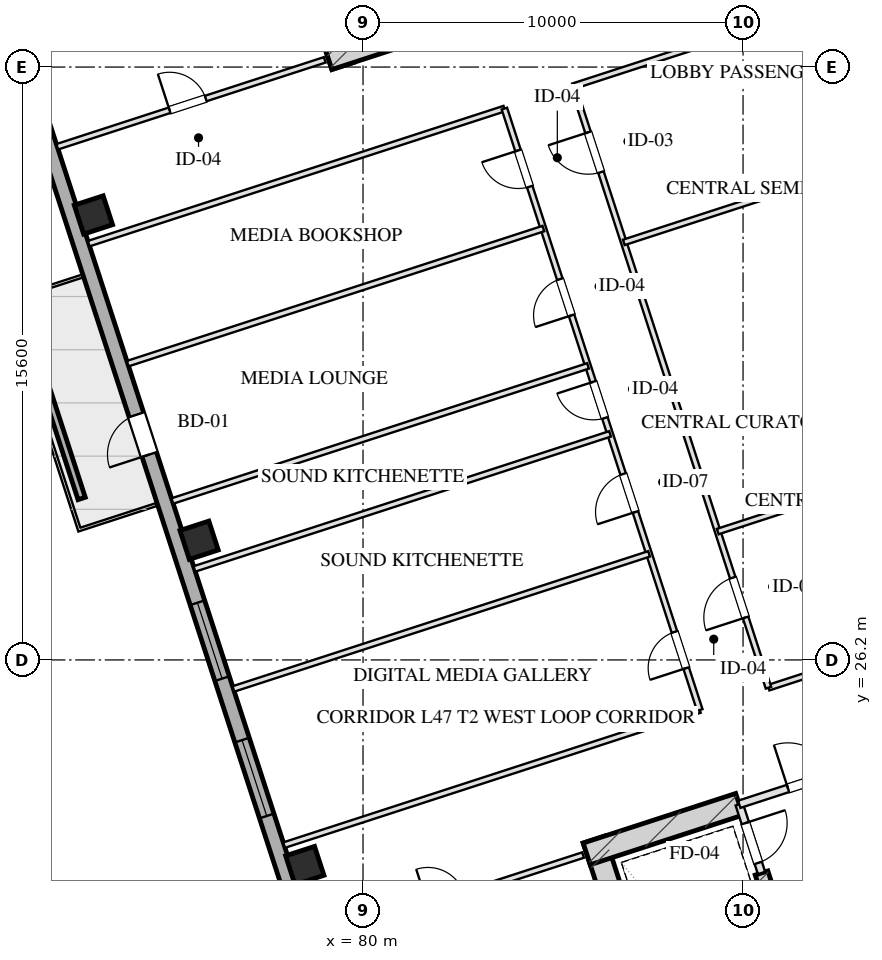
"""IFC4 building model, lengths in metres.
Left out: names, types, materials, properties, quantities, classifications, styles, units other than length and angle.
Written with IfcOpenShell. Run it as: python <this file> out.ifc"""

import sys

from ifc_helpers import new_model, si_unit, direction, frame, frame_2d, origin, origin_2d, place, context, subcontext, project, spatial, rectangle, hollow_rectangle, extrude, element, fill, save


model = new_model("IFC4")
c1 = context("Model", 3, precision=1e-05, world=origin(), true_north=direction((0.0, 1.0)))
c2 = subcontext(c1, "Body", "Model", "MODEL_VIEW")
j1 = project(units=[si_unit("LENGTHUNIT", "METRE"), si_unit("PLANEANGLEUNIT", "RADIAN")], contexts=[c1])
p1 = place(None, origin())
s1 = spatial("IfcSite", under=j1, at=p1, CompositionType="ELEMENT")
p2 = place(p1, origin())
s2 = spatial("IfcBuilding", under=s1, at=p2, CompositionType="ELEMENT")
p3 = place(p2, frame((0.0, 0.0, 177.1)))
s3 = spatial("IfcBuildingStorey", under=s2, at=p3, CompositionType="ELEMENT", Elevation=177.1)
p4 = place(p3, frame((86.078, 21.475, 0.0), z_axis=(0.0, 0.0, 1.0), x_axis=(0.309017938678, -0.951056209472, 0.0)))
e1 = element("IfcWall", 1, at=p4, inside=s3, PredefinedType="SHEAR", context=c2, shape_type="SweptSolid", body=[
    extrude(rectangle(XDim=9.48, YDim=0.6, at=frame_2d((4.74, 0.0))), origin(), (0.0, 0.0, 1.0), 3.45),
])
p5 = place(p3, frame((90.486, 20.594, 0.0), z_axis=(0.0, 0.0, 1.0), x_axis=(0.309020428229, -0.951055400562, 0.0)))
e2 = element("IfcWall", 2, at=p5, inside=s3, PredefinedType="SHEAR", context=c2, shape_type="SweptSolid", body=[
    extrude(rectangle(XDim=6.98, YDim=0.35, at=frame_2d((3.49, 0.0))), origin(), (0.0, 0.0, 1.0), 3.45),
])
p6 = place(p3, frame((85.886, 21.097, 0.0), z_axis=(0.0, 0.0, 1.0), x_axis=(0.951068073652, 0.308981422225, 0.0)))
e3 = element("IfcWall", 3, at=p6, inside=s3, PredefinedType="SHEAR", context=c2, shape_type="SweptSolid", body=[
    extrude(rectangle(XDim=4.22, YDim=0.6, at=frame_2d((2.11, 0.0))), origin(), (0.0, 0.0, 1.0), 3.45),
])
p7 = place(p3, frame((79.466, 41.828, 0.0), z_axis=(0.0, 0.0, 1.0), x_axis=(-0.309041232772, 0.951048640421, 0.0)))
e4 = element("IfcWall", 4, at=p7, inside=s3, PredefinedType="SHEAR", context=c2, shape_type="SweptSolid", body=[
    extrude(rectangle(XDim=9.48, YDim=0.6, at=frame_2d((4.74, 0.0))), origin(), (0.0, 0.0, 1.0), 3.45),
])
p8 = place(p3, frame((79.087, 42.021, 0.0), z_axis=(0.0, 0.0, 1.0), x_axis=(0.951062550203, 0.3089984233, 0.0)))
e5 = element("IfcWall", 5, at=p8, inside=s3, PredefinedType="SHEAR", context=c2, shape_type="SweptSolid", body=[
    extrude(rectangle(XDim=4.22, YDim=0.6, at=frame_2d((2.11, 0.0))), origin(), (0.0, 0.0, 1.0), 3.45),
])
for number, where, z_axis, x_axis in (
    (6, (78.468, 20.79, 0.0), (0.0, 0.0, 1.0), (0.951, 0.309, 0.0)),
    (7, (75.687, 29.349, 0.0), (0.0, 0.0, 1.0), (0.951, 0.309, 0.0)),
    (8, (72.906, 37.909, 0.0), (0.0, 0.0, 1.0), (0.951, 0.309, 0.0)),
):
    element("IfcColumn", number, at=place(p3, frame(where, z_axis=z_axis, x_axis=x_axis)), inside=s3, PredefinedType="COLUMN", context=c2, shape_type="SweptSolid", body=[
        extrude(hollow_rectangle(XDim=0.8, YDim=0.8, WallThickness=0.028, at=origin_2d()), origin(), (0.0, 0.0, 1.0), 3.451),
    ])
p9 = place(p3, frame((81.776, 8.827, 0.0), z_axis=(0.0, 0.0, 1.0), x_axis=(-0.309014228706, 0.951057414911, 0.0)))
e9 = element("IfcWall", 9, at=p9, inside=s3, PredefinedType="SOLIDWALL", context=c2, shape_type="SweptSolid", body=[
    extrude(rectangle(XDim=42.8, YDim=0.4, at=frame_2d((21.4, 0.0))), origin(), (0.0, 0.0, 1.0), 2.61),
])
p10 = place(p9, frame((13.95, 0.0, 0.75)))
e10 = element("IfcOpeningElement", 10, at=p10, cuts=e9, PredefinedType="OPENING", context=c2, shape_type="SweptSolid", body=[
    extrude(rectangle(XDim=2.1, YDim=1.46, at=frame_2d((1.05, 0.73))), frame((0.0, 0.21, 0.0), z_axis=(0.0, -1.0, 0.0), x_axis=(1.0, 0.0, 0.0)), (0.0, 0.0, 1.0), 0.42),
])
p11 = place(p9, frame((17.75, 0.0, 0.75)))
e11 = element("IfcOpeningElement", 11, at=p11, cuts=e9, PredefinedType="OPENING", context=c2, shape_type="SweptSolid", body=[
    extrude(rectangle(XDim=2.1, YDim=1.46, at=frame_2d((1.05, 0.73))), frame((0.0, 0.21, 0.0), z_axis=(0.0, -1.0, 0.0), x_axis=(1.0, 0.0, 0.0)), (0.0, 0.0, 1.0), 0.42),
])
p12 = place(p9, frame((23.95, 0.0, 0.0)))
e12 = element("IfcOpeningElement", 12, at=p12, cuts=e9, PredefinedType="OPENING", context=c2, shape_type="SweptSolid", body=[
    extrude(rectangle(XDim=1.1, YDim=2.15, at=frame_2d((0.55, 1.075))), frame((0.0, 0.21, 0.0), z_axis=(0.0, -1.0, 0.0), x_axis=(1.0, 0.0, 0.0)), (0.0, 0.0, 1.0), 0.42),
])
p13 = place(p3, frame((72.596, 30.448, 0.0), z_axis=(0.0, 0.0, 1.0), x_axis=(-0.30900096172, 0.951061725471, 0.0)))
e13 = element("IfcWall", 13, at=p13, inside=s3, PredefinedType="PARAPET", context=c2, shape_type="SweptSolid", body=[
    extrude(rectangle(XDim=4.8, YDim=0.2, at=frame_2d((2.4, 0.0))), origin(), (0.0, 0.0, 1.0), 0.75),
])
p14 = place(p3, frame((89.899, 22.401, 0.0), z_axis=(0.0, 0.0, 1.0), x_axis=(0.308932062672, -0.951084108086, 0.0)))
e14 = element("IfcWall", 14, at=p14, inside=s3, PredefinedType="PARTITIONING", context=c2, shape_type="SweptSolid", body=[
    extrude(rectangle(XDim=1.9, YDim=0.2, at=frame_2d((0.95, 0.0))), origin(), (0.0, 0.0, 1.0), 3.175),
])
p15 = place(p14, frame((0.52, 0.0, 0.0)))
e15 = element("IfcOpeningElement", 15, at=p15, cuts=e14, PredefinedType="OPENING", context=c2, shape_type="SweptSolid", body=[
    extrude(rectangle(XDim=1.1, YDim=2.05, at=frame_2d((0.55, 1.025))), frame((0.0, 0.11, 0.0), z_axis=(0.0, -1.0, 0.0), x_axis=(1.0, 0.0, 0.0)), (0.0, 0.0, 1.0), 0.22),
])
p16 = place(p3, frame((89.899, 22.401, 0.0), z_axis=(0.0, 0.0, 1.0), x_axis=(0.951046716504, 0.309047153403, 0.0)))
e16 = element("IfcWall", 16, at=p16, inside=s3, PredefinedType="PARTITIONING", context=c2, shape_type="SweptSolid", body=[
    extrude(rectangle(XDim=3.83, YDim=0.2, at=frame_2d((1.915, 0.0))), origin(), (0.0, 0.0, 1.0), 3.175),
])
p17 = place(p16, frame((1.35, 0.0, 0.0)))
e17 = element("IfcOpeningElement", 17, at=p17, cuts=e16, PredefinedType="OPENING", context=c2, shape_type="SweptSolid", body=[
    extrude(rectangle(XDim=1.2, YDim=2.05, at=frame_2d((0.6, 1.025))), frame((0.0, 0.11, 0.0), z_axis=(0.0, -1.0, 0.0), x_axis=(1.0, 0.0, 0.0)), (0.0, 0.0, 1.0), 0.22),
])
p18 = place(p3, frame((78.753, 18.78, 0.0), z_axis=(0.0, 0.0, 1.0), x_axis=(0.951060977215, 0.309003264738, 0.0)))
e18 = element("IfcWall", 18, at=p18, inside=s3, PredefinedType="PARTITIONING", context=c2, shape_type="SweptSolid", body=[
    extrude(rectangle(XDim=7.4, YDim=0.15, at=frame_2d((3.7, 0.0))), origin(), (0.0, 0.0, 1.0), 3.175),
])
p19 = place(p18, frame((3.108, 0.0, 0.0)))
e19 = element("IfcOpeningElement", 19, at=p19, cuts=e18, PredefinedType="OPENING", context=c2, shape_type="SweptSolid", body=[
    extrude(rectangle(XDim=1.0, YDim=2.05, at=frame_2d((0.5, 1.025))), frame((0.0, 0.085, 0.0), z_axis=(0.0, -1.0, 0.0), x_axis=(1.0, 0.0, 0.0)), (0.0, 0.0, 1.0), 0.17),
])
p20 = place(p3, frame((71.955, 39.703, 0.0), z_axis=(0.0, 0.0, 1.0), x_axis=(0.951060977215, 0.309003264738, 0.0)))
e20 = element("IfcWall", 20, at=p20, inside=s3, PredefinedType="PARTITIONING", context=c2, shape_type="SweptSolid", body=[
    extrude(rectangle(XDim=7.4, YDim=0.15, at=frame_2d((3.7, 0.0))), origin(), (0.0, 0.0, 1.0), 3.175),
])
p21 = place(p20, frame((3.108, 0.0, 0.0)))
e21 = element("IfcOpeningElement", 21, at=p21, cuts=e20, PredefinedType="OPENING", context=c2, shape_type="SweptSolid", body=[
    extrude(rectangle(XDim=1.0, YDim=2.05, at=frame_2d((0.5, 1.025))), frame((0.0, 0.085, 0.0), z_axis=(0.0, -1.0, 0.0), x_axis=(1.0, 0.0, 0.0)), (0.0, 0.0, 1.0), 0.17),
])
p22 = place(p3, frame((77.925, 21.328, 0.0), z_axis=(0.0, 0.0, 1.0), x_axis=(0.951054972381, 0.309021746015, 0.0)))
e22 = element("IfcWall", 22, at=p22, inside=s3, PredefinedType="PARTITIONING", context=c2, shape_type="SweptSolid", body=[
    extrude(rectangle(XDim=11.5, YDim=0.15, at=frame_2d((5.75, 0.0))), origin(), (0.0, 0.0, 1.0), 3.175),
])
p23 = place(p3, frame((90.669, 25.469, 0.0), z_axis=(0.0, 0.0, 1.0), x_axis=(0.95106136293, 0.309002077568, 0.0)))
e23 = element("IfcWall", 23, at=p23, inside=s3, PredefinedType="PARTITIONING", context=c2, shape_type="SweptSolid", body=[
    extrude(rectangle(XDim=8.15, YDim=0.15, at=frame_2d((4.075, 0.0))), origin(), (0.0, 0.0, 1.0), 3.175),
])
p24 = place(p3, frame((72.783, 37.154, 0.0), z_axis=(0.0, 0.0, 1.0), x_axis=(0.951056999652, 0.309015506751, 0.0)))
e24 = element("IfcWall", 24, at=p24, inside=s3, PredefinedType="PARTITIONING", context=c2, shape_type="SweptSolid", body=[
    extrude(rectangle(XDim=11.5, YDim=0.15, at=frame_2d((5.75, 0.0))), origin(), (0.0, 0.0, 1.0), 3.175),
])
p25 = place(p3, frame((85.527, 41.295, 0.0), z_axis=(0.0, 0.0, 1.0), x_axis=(0.951055419664, 0.309020369437, 0.0)))
e25 = element("IfcWall", 25, at=p25, inside=s3, PredefinedType="PARTITIONING", context=c2, shape_type="SweptSolid", body=[
    extrude(rectangle(XDim=8.15, YDim=0.15, at=frame_2d((4.075, 0.0))), origin(), (0.0, 0.0, 1.0), 3.175),
])
p26 = place(p3, frame((88.862, 24.882, 0.0), z_axis=(0.0, 0.0, 1.0), x_axis=(-0.309008771245, 0.951059188113, 0.0)))
e26 = element("IfcWall", 26, at=p26, inside=s3, PredefinedType="PARTITIONING", context=c2, shape_type="SweptSolid", body=[
    extrude(rectangle(XDim=16.64, YDim=0.15, at=frame_2d((8.32, 0.0))), origin(), (0.0, 0.0, 1.0), 3.175),
])
p27 = place(p26, frame((1.16, 0.0, 0.0)))
e27 = element("IfcOpeningElement", 27, at=p27, cuts=e26, PredefinedType="OPENING", context=c2, shape_type="SweptSolid", body=[
    extrude(rectangle(XDim=1.0, YDim=2.05, at=frame_2d((0.5, 1.025))), frame((0.0, 0.085, 0.0), z_axis=(0.0, -1.0, 0.0), x_axis=(1.0, 0.0, 0.0)), (0.0, 0.0, 1.0), 0.17),
])
p28 = place(p26, frame((5.48, 0.0, 0.0)))
e28 = element("IfcOpeningElement", 28, at=p28, cuts=e26, PredefinedType="OPENING", context=c2, shape_type="SweptSolid", body=[
    extrude(rectangle(XDim=1.05, YDim=2.05, at=frame_2d((0.525, 1.025))), frame((0.0, 0.085, 0.0), z_axis=(0.0, -1.0, 0.0), x_axis=(1.0, 0.0, 0.0)), (0.0, 0.0, 1.0), 0.17),
])
p29 = place(p26, frame((8.08, 0.0, 0.0)))
e29 = element("IfcOpeningElement", 29, at=p29, cuts=e26, PredefinedType="OPENING", context=c2, shape_type="SweptSolid", body=[
    extrude(rectangle(XDim=1.0, YDim=2.05, at=frame_2d((0.5, 1.025))), frame((0.0, 0.085, 0.0), z_axis=(0.0, -1.0, 0.0), x_axis=(1.0, 0.0, 0.0)), (0.0, 0.0, 1.0), 0.17),
])
p30 = place(p26, frame((10.92, 0.0, 0.0)))
e30 = element("IfcOpeningElement", 30, at=p30, cuts=e26, PredefinedType="OPENING", context=c2, shape_type="SweptSolid", body=[
    extrude(rectangle(XDim=1.0, YDim=2.05, at=frame_2d((0.5, 1.025))), frame((0.0, 0.085, 0.0), z_axis=(0.0, -1.0, 0.0), x_axis=(1.0, 0.0, 0.0)), (0.0, 0.0, 1.0), 0.17),
])
p31 = place(p26, frame((14.48, 0.0, 0.0)))
e31 = element("IfcOpeningElement", 31, at=p31, cuts=e26, PredefinedType="OPENING", context=c2, shape_type="SweptSolid", body=[
    extrude(rectangle(XDim=1.0, YDim=2.05, at=frame_2d((0.5, 1.025))), frame((0.0, 0.085, 0.0), z_axis=(0.0, -1.0, 0.0), x_axis=(1.0, 0.0, 0.0)), (0.0, 0.0, 1.0), 0.17),
])
p32 = place(p3, frame((90.669, 25.469, 0.0), z_axis=(0.0, 0.0, 1.0), x_axis=(-0.309022042254, 0.951054876125, 0.0)))
e32 = element("IfcWall", 32, at=p32, inside=s3, PredefinedType="PARTITIONING", context=c2, shape_type="SweptSolid", body=[
    extrude(rectangle(XDim=16.64, YDim=0.15, at=frame_2d((8.32, 0.0))), origin(), (0.0, 0.0, 1.0), 3.175),
])
p33 = place(p32, frame((1.944, 0.0, 0.0)))
e33 = element("IfcOpeningElement", 33, at=p33, cuts=e32, PredefinedType="OPENING", context=c2, shape_type="SweptSolid", body=[
    extrude(rectangle(XDim=1.1, YDim=2.05, at=frame_2d((0.55, 1.025))), frame((0.0, 0.085, 0.0), z_axis=(0.0, -1.0, 0.0), x_axis=(1.0, 0.0, 0.0)), (0.0, 0.0, 1.0), 0.17),
])
p34 = place(p32, frame((14.264, 0.0, 0.0)))
e34 = element("IfcOpeningElement", 34, at=p34, cuts=e32, PredefinedType="OPENING", context=c2, shape_type="SweptSolid", body=[
    extrude(rectangle(XDim=1.1, YDim=2.05, at=frame_2d((0.55, 1.025))), frame((0.0, 0.085, 0.0), z_axis=(0.0, -1.0, 0.0), x_axis=(1.0, 0.0, 0.0)), (0.0, 0.0, 1.0), 0.17),
])
p35 = place(p3, frame((89.334, 29.578, 0.0), z_axis=(0.0, 0.0, 1.0), x_axis=(0.951052558989, 0.309029173445, 0.0)))
e35 = element("IfcWall", 35, at=p35, inside=s3, PredefinedType="PARTITIONING", context=c2, shape_type="SweptSolid", body=[
    extrude(rectangle(XDim=8.15, YDim=0.15, at=frame_2d((4.075, 0.0))), origin(), (0.0, 0.0, 1.0), 3.175),
])
p36 = place(p3, frame((86.862, 37.186, 0.0), z_axis=(0.0, 0.0, 1.0), x_axis=(0.95106422313, 0.308993274169, 0.0)))
e36 = element("IfcWall", 36, at=p36, inside=s3, PredefinedType="PARTITIONING", context=c2, shape_type="SweptSolid", body=[
    extrude(rectangle(XDim=8.15, YDim=0.15, at=frame_2d((4.075, 0.0))), origin(), (0.0, 0.0, 1.0), 3.175),
])
for number, where, z_axis, x_axis in (
    (37, (76.59, 25.437, 0.0), (0.0, 0.0, 1.0), (0.951, 0.309, 0.0)),
    (38, (75.564, 28.594, 0.0), (0.0, 0.0, 1.0), (0.951, 0.309, 0.0)),
):
    element("IfcWall", number, at=place(p3, frame(where, z_axis=z_axis, x_axis=x_axis)), inside=s3, PredefinedType="PARTITIONING", context=c2, shape_type="SweptSolid", body=[
        extrude(rectangle(XDim=11.5, YDim=0.15, at=frame_2d((5.75, 0.0))), origin(), (0.0, 0.0, 1.0), 3.175),
    ])
for number, where, z_axis, x_axis in (
    (39, (74.983, 30.382, 0.0), (0.0, 0.0, 1.0), (0.951, 0.309, 0.0)),
    (40, (73.809, 33.996, 0.0), (0.0, 0.0, 1.0), (0.951, 0.309, 0.0)),
):
    element("IfcWall", number, at=place(p3, frame(where, z_axis=z_axis, x_axis=x_axis)), inside=s3, PredefinedType="PARTITIONING", context=c2, shape_type="SweptSolid", body=[
        extrude(rectangle(XDim=11.5, YDim=0.15, at=frame_2d((5.75, 0.0))), origin(), (0.0, 0.0, 1.0), 3.175),
    ])
p37 = place(p10, origin())
e41 = element("IfcWindow", 41, at=p37, inside=s3, PartitioningType="TRIPLE_PANEL_VERTICAL", PredefinedType="WINDOW", context=c2, shape_type="SweptSolid", body=[
    extrude(rectangle(XDim=2.1, YDim=1.46, at=frame_2d((1.05, 0.73))), frame((0.0, 0.03, 0.0), z_axis=(0.0, -1.0, 0.0), x_axis=(1.0, 0.0, 0.0)), (0.0, 0.0, 1.0), 0.06),
])
fill(e10, e41)
p38 = place(p11, origin())
e42 = element("IfcWindow", 42, at=p38, inside=s3, PartitioningType="TRIPLE_PANEL_VERTICAL", PredefinedType="WINDOW", context=c2, shape_type="SweptSolid", body=[
    extrude(rectangle(XDim=2.1, YDim=1.46, at=frame_2d((1.05, 0.73))), frame((0.0, 0.03, 0.0), z_axis=(0.0, -1.0, 0.0), x_axis=(1.0, 0.0, 0.0)), (0.0, 0.0, 1.0), 0.06),
])
fill(e11, e42)
p39 = place(p12, origin())
e43 = element("IfcDoor", 43, at=p39, inside=s3, OperationType="SINGLE_SWING_LEFT", PredefinedType="DOOR", context=c2, shape_type="SweptSolid", body=[
    extrude(rectangle(XDim=1.1, YDim=2.15, at=frame_2d((0.55, 1.075))), frame((0.0, 0.025, 0.0), z_axis=(0.0, -1.0, 0.0), x_axis=(1.0, 0.0, 0.0)), (0.0, 0.0, 1.0), 0.05),
])
fill(e12, e43)
p40 = place(p15, origin())
e44 = element("IfcDoor", 44, at=p40, inside=s3, OperationType="SINGLE_SWING_LEFT", PredefinedType="DOOR", context=c2, shape_type="SweptSolid", body=[
    extrude(rectangle(XDim=1.1, YDim=2.05, at=frame_2d((0.55, 1.025))), frame((0.0, 0.025, 0.0), z_axis=(0.0, -1.0, 0.0), x_axis=(1.0, 0.0, 0.0)), (0.0, 0.0, 1.0), 0.05),
])
fill(e15, e44)
p41 = place(p17, origin())
e45 = element("IfcDoor", 45, at=p41, inside=s3, OperationType="SINGLE_SWING_LEFT", PredefinedType="DOOR", context=c2, shape_type="SweptSolid", body=[
    extrude(rectangle(XDim=1.2, YDim=2.05, at=frame_2d((0.6, 1.025))), frame((0.0, 0.025, 0.0), z_axis=(0.0, -1.0, 0.0), x_axis=(1.0, 0.0, 0.0)), (0.0, 0.0, 1.0), 0.05),
])
fill(e17, e45)
p42 = place(p21, origin())
e46 = element("IfcDoor", 46, at=p42, inside=s3, OperationType="SINGLE_SWING_LEFT", PredefinedType="DOOR", context=c2, shape_type="SweptSolid", body=[
    extrude(rectangle(XDim=1.0, YDim=2.05, at=frame_2d((0.5, 1.025))), frame((0.0, 0.025, 0.0), z_axis=(0.0, -1.0, 0.0), x_axis=(1.0, 0.0, 0.0)), (0.0, 0.0, 1.0), 0.05),
])
fill(e21, e46)
p43 = place(p27, origin())
e47 = element("IfcDoor", 47, at=p43, inside=s3, OperationType="SINGLE_SWING_LEFT", PredefinedType="DOOR", context=c2, shape_type="SweptSolid", body=[
    extrude(rectangle(XDim=1.0, YDim=2.05, at=frame_2d((0.5, 1.025))), frame((0.0, 0.025, 0.0), z_axis=(0.0, -1.0, 0.0), x_axis=(1.0, 0.0, 0.0)), (0.0, 0.0, 1.0), 0.05),
])
fill(e27, e47)
p44 = place(p28, origin())
e48 = element("IfcDoor", 48, at=p44, inside=s3, OperationType="SINGLE_SWING_LEFT", PredefinedType="DOOR", context=c2, shape_type="SweptSolid", body=[
    extrude(rectangle(XDim=1.05, YDim=2.05, at=frame_2d((0.525, 1.025))), frame((0.0, 0.025, 0.0), z_axis=(0.0, -1.0, 0.0), x_axis=(1.0, 0.0, 0.0)), (0.0, 0.0, 1.0), 0.05),
])
fill(e28, e48)
p45 = place(p29, origin())
e49 = element("IfcDoor", 49, at=p45, inside=s3, OperationType="SINGLE_SWING_RIGHT", PredefinedType="DOOR", context=c2, shape_type="SweptSolid", body=[
    extrude(rectangle(XDim=1.0, YDim=2.05, at=frame_2d((0.5, 1.025))), frame((0.0, 0.025, 0.0), z_axis=(0.0, -1.0, 0.0), x_axis=(1.0, 0.0, 0.0)), (0.0, 0.0, 1.0), 0.05),
])
fill(e29, e49)
p46 = place(p30, origin())
e50 = element("IfcDoor", 50, at=p46, inside=s3, OperationType="SINGLE_SWING_LEFT", PredefinedType="DOOR", context=c2, shape_type="SweptSolid", body=[
    extrude(rectangle(XDim=1.0, YDim=2.05, at=frame_2d((0.5, 1.025))), frame((0.0, 0.025, 0.0), z_axis=(0.0, -1.0, 0.0), x_axis=(1.0, 0.0, 0.0)), (0.0, 0.0, 1.0), 0.05),
])
fill(e30, e50)
p47 = place(p31, origin())
e51 = element("IfcDoor", 51, at=p47, inside=s3, OperationType="SINGLE_SWING_RIGHT", PredefinedType="DOOR", context=c2, shape_type="SweptSolid", body=[
    extrude(rectangle(XDim=1.0, YDim=2.05, at=frame_2d((0.5, 1.025))), frame((0.0, 0.025, 0.0), z_axis=(0.0, -1.0, 0.0), x_axis=(1.0, 0.0, 0.0)), (0.0, 0.0, 1.0), 0.05),
])
fill(e31, e51)
p48 = place(p33, origin())
e52 = element("IfcDoor", 52, at=p48, inside=s3, OperationType="SINGLE_SWING_LEFT", PredefinedType="DOOR", context=c2, shape_type="SweptSolid", body=[
    extrude(rectangle(XDim=1.1, YDim=2.05, at=frame_2d((0.55, 1.025))), frame((0.0, 0.025, 0.0), z_axis=(0.0, -1.0, 0.0), x_axis=(1.0, 0.0, 0.0)), (0.0, 0.0, 1.0), 0.05),
])
fill(e33, e52)
p49 = place(p34, origin())
e53 = element("IfcDoor", 53, at=p49, inside=s3, OperationType="SINGLE_SWING_RIGHT", PredefinedType="DOOR", context=c2, shape_type="SweptSolid", body=[
    extrude(rectangle(XDim=1.1, YDim=2.05, at=frame_2d((0.55, 1.025))), frame((0.0, 0.025, 0.0), z_axis=(0.0, -1.0, 0.0), x_axis=(1.0, 0.0, 0.0)), (0.0, 0.0, 1.0), 0.05),
])
fill(e34, e53)
save(model, sys.argv[1])
